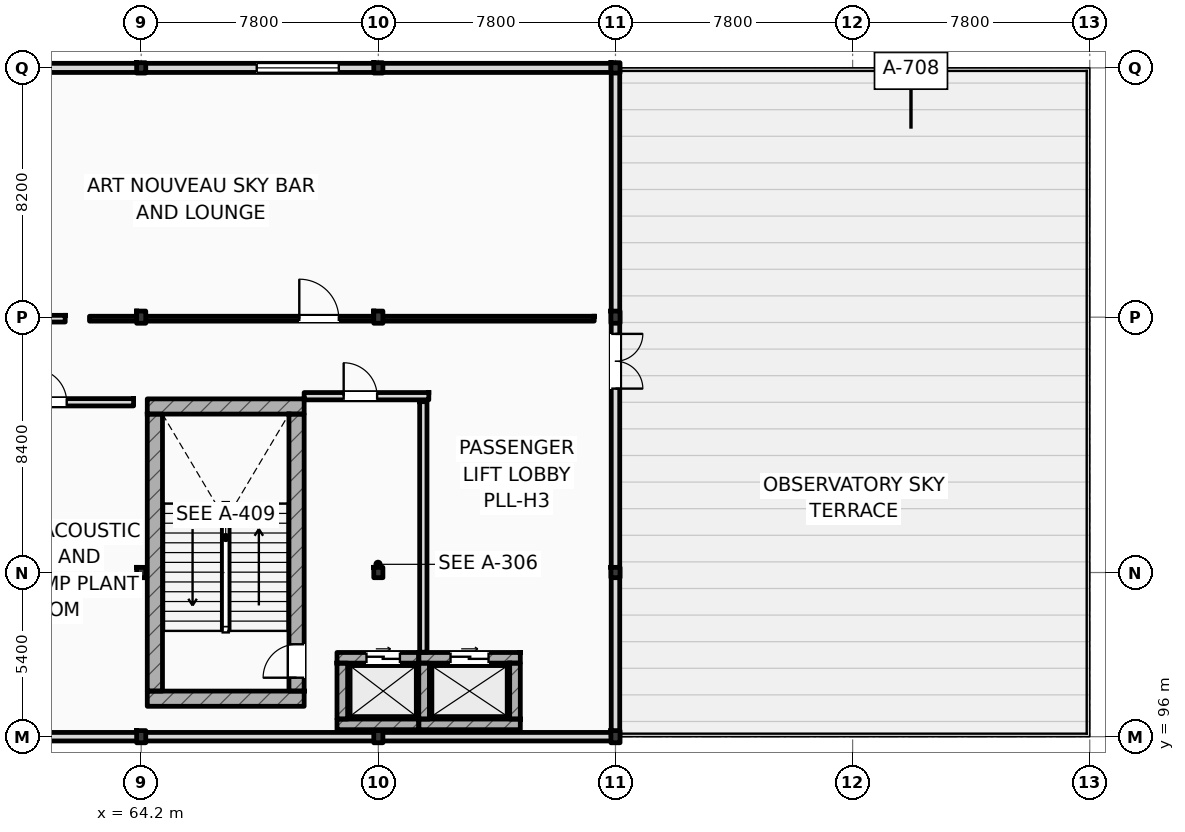
"""IFC4 building model, lengths in metres.
Left out: names, types, materials, properties, quantities, classifications, styles, units other than length and angle.
Written with IfcOpenShell. Run it as: python <this file> out.ifc"""

import sys

from ifc_helpers import new_model, si_unit, direction, frame, frame_2d, origin, origin_2d, place, context, subcontext, project, spatial, rectangle, i_section, extrude, element, fill, save


model = new_model("IFC4")
c1 = context("Model", 3, precision=1e-05, world=origin(), true_north=direction((0.0, 1.0)))
c2 = subcontext(c1, "Body", "Model", "MODEL_VIEW")
j1 = project(units=[si_unit("LENGTHUNIT", "METRE"), si_unit("PLANEANGLEUNIT", "RADIAN")], contexts=[c1])
p1 = place(None, origin())
s1 = spatial("IfcSite", under=j1, at=p1, CompositionType="ELEMENT")
p2 = place(p1, origin())
s2 = spatial("IfcBuilding", under=s1, at=p2, CompositionType="ELEMENT")
p3 = place(p2, frame((0.0, 0.0, 46.8)))
s3 = spatial("IfcBuildingStorey", under=s2, at=p3, CompositionType="ELEMENT", Elevation=46.8)
p4 = place(p3, frame((64.2, 96.0, 0.0), z_axis=(0.0, 0.0, 1.0), x_axis=(1.0, 0.0, 0.0)))
e1 = element("IfcColumn", 1, at=p4, inside=s3, PredefinedType="COLUMN", context=c2, shape_type="SweptSolid", body=[
    extrude(i_section(OverallWidth=0.3, OverallDepth=0.4, WebThickness=0.013, FlangeThickness=0.024, FilletRadius=0.027, at=origin_2d()), origin(), (0.0, 0.0, 1.0), 4.8),
])
p5 = place(p3, frame((64.2, 101.4, 0.0), z_axis=(0.0, 0.0, 1.0), x_axis=(1.0, 0.0, 0.0)))
e2 = element("IfcColumn", 2, at=p5, inside=s3, PredefinedType="COLUMN", context=c2, shape_type="SweptSolid", body=[
    extrude(i_section(OverallWidth=0.3, OverallDepth=0.34, WebThickness=0.012, FlangeThickness=0.021, FilletRadius=0.027, at=origin_2d()), origin(), (0.0, 0.0, 1.0), 4.8),
])
p6 = place(p3, frame((64.2, 109.8, 0.0), z_axis=(0.0, 0.0, 1.0), x_axis=(1.0, 0.0, 0.0)))
e3 = element("IfcColumn", 3, at=p6, inside=s3, PredefinedType="COLUMN", context=c2, shape_type="SweptSolid", body=[
    extrude(i_section(OverallWidth=0.3, OverallDepth=0.4, WebThickness=0.013, FlangeThickness=0.024, FilletRadius=0.027, at=origin_2d()), origin(), (0.0, 0.0, 1.0), 4.8),
])
p7 = place(p3, frame((64.2, 118.0, 0.0), z_axis=(0.0, 0.0, 1.0), x_axis=(1.0, 0.0, 0.0)))
e4 = element("IfcColumn", 4, at=p7, inside=s3, PredefinedType="COLUMN", context=c2, shape_type="SweptSolid", body=[
    extrude(i_section(OverallWidth=0.3, OverallDepth=0.34, WebThickness=0.012, FlangeThickness=0.021, FilletRadius=0.027, at=origin_2d()), origin(), (0.0, 0.0, 1.0), 4.8),
])
p8 = place(p3, frame((72.0, 96.0, 0.0), z_axis=(0.0, 0.0, 1.0), x_axis=(1.0, 0.0, 0.0)))
e5 = element("IfcColumn", 5, at=p8, inside=s3, PredefinedType="COLUMN", context=c2, shape_type="SweptSolid", body=[
    extrude(i_section(OverallWidth=0.3, OverallDepth=0.4, WebThickness=0.013, FlangeThickness=0.024, FilletRadius=0.027, at=origin_2d()), origin(), (0.0, 0.0, 1.0), 4.8),
])
p9 = place(p3, frame((72.0, 101.4, 0.0), z_axis=(0.0, 0.0, 1.0), x_axis=(1.0, 0.0, 0.0)))
e6 = element("IfcColumn", 6, at=p9, inside=s3, PredefinedType="COLUMN", context=c2, shape_type="SweptSolid", body=[
    extrude(i_section(OverallWidth=0.3, OverallDepth=0.34, WebThickness=0.012, FlangeThickness=0.021, FilletRadius=0.027, at=origin_2d()), origin(), (0.0, 0.0, 1.0), 4.8),
])
p10 = place(p3, frame((72.0, 109.8, 0.0), z_axis=(0.0, 0.0, 1.0), x_axis=(1.0, 0.0, 0.0)))
e7 = element("IfcColumn", 7, at=p10, inside=s3, PredefinedType="COLUMN", context=c2, shape_type="SweptSolid", body=[
    extrude(i_section(OverallWidth=0.3, OverallDepth=0.4, WebThickness=0.013, FlangeThickness=0.024, FilletRadius=0.027, at=origin_2d()), origin(), (0.0, 0.0, 1.0), 4.8),
])
p11 = place(p3, frame((72.0, 118.0, 0.0), z_axis=(0.0, 0.0, 1.0), x_axis=(1.0, 0.0, 0.0)))
e8 = element("IfcColumn", 8, at=p11, inside=s3, PredefinedType="COLUMN", context=c2, shape_type="SweptSolid", body=[
    extrude(i_section(OverallWidth=0.3, OverallDepth=0.34, WebThickness=0.012, FlangeThickness=0.021, FilletRadius=0.027, at=origin_2d()), origin(), (0.0, 0.0, 1.0), 4.8),
])
p12 = place(p3, frame((79.8, 96.0, 0.0), z_axis=(0.0, 0.0, 1.0), x_axis=(1.0, 0.0, 0.0)))
e9 = element("IfcColumn", 9, at=p12, inside=s3, PredefinedType="COLUMN", context=c2, shape_type="SweptSolid", body=[
    extrude(i_section(OverallWidth=0.3, OverallDepth=0.4, WebThickness=0.013, FlangeThickness=0.024, FilletRadius=0.027, at=origin_2d()), origin(), (0.0, 0.0, 1.0), 4.8),
])
p13 = place(p3, frame((79.8, 101.4, 0.0), z_axis=(0.0, 0.0, 1.0), x_axis=(1.0, 0.0, 0.0)))
e10 = element("IfcColumn", 10, at=p13, inside=s3, PredefinedType="COLUMN", context=c2, shape_type="SweptSolid", body=[
    extrude(i_section(OverallWidth=0.3, OverallDepth=0.34, WebThickness=0.012, FlangeThickness=0.021, FilletRadius=0.027, at=origin_2d()), origin(), (0.0, 0.0, 1.0), 4.8),
])
p14 = place(p3, frame((79.8, 109.8, 0.0), z_axis=(0.0, 0.0, 1.0), x_axis=(1.0, 0.0, 0.0)))
e11 = element("IfcColumn", 11, at=p14, inside=s3, PredefinedType="COLUMN", context=c2, shape_type="SweptSolid", body=[
    extrude(i_section(OverallWidth=0.3, OverallDepth=0.4, WebThickness=0.013, FlangeThickness=0.024, FilletRadius=0.027, at=origin_2d()), origin(), (0.0, 0.0, 1.0), 4.8),
])
p15 = place(p3, frame((79.8, 118.0, 0.0), z_axis=(0.0, 0.0, 1.0), x_axis=(1.0, 0.0, 0.0)))
e12 = element("IfcColumn", 12, at=p15, inside=s3, PredefinedType="COLUMN", context=c2, shape_type="SweptSolid", body=[
    extrude(i_section(OverallWidth=0.3, OverallDepth=0.34, WebThickness=0.012, FlangeThickness=0.021, FilletRadius=0.027, at=origin_2d()), origin(), (0.0, 0.0, 1.0), 4.8),
])
for number, where, z_axis, x_axis in (
    (13, (64.4, 106.862, 0.0), (0.0, 0.0, 1.0), (1.0, 0.0, 0.0)),
    (14, (64.4, 97.25, 0.0), (0.0, 0.0, 1.0), (1.0, 0.0, 0.0)),
):
    element("IfcWall", number, at=place(p3, frame(where, z_axis=z_axis, x_axis=x_axis)), inside=s3, PredefinedType="SHEAR", context=c2, shape_type="SweptSolid", body=[
        extrude(rectangle(XDim=5.16, YDim=0.5, at=frame_2d((2.58, 0.0))), origin(), (0.0, 0.0, 1.0), 4.8),
    ])
p16 = place(p3, frame((64.65, 97.5, 0.0), z_axis=(0.0, 0.0, 1.0), x_axis=(0.0, 1.0, 0.0)))
e15 = element("IfcWall", 15, at=p16, inside=s3, PredefinedType="SHEAR", context=c2, shape_type="SweptSolid", body=[
    extrude(rectangle(XDim=9.112, YDim=0.5, at=frame_2d((4.556, 0.0))), origin(), (0.0, 0.0, 1.0), 4.8),
])
p17 = place(p3, frame((69.31, 97.5, 0.0), z_axis=(0.0, 0.0, 1.0), x_axis=(0.0, 1.0, 0.0)))
e16 = element("IfcWall", 16, at=p17, inside=s3, PredefinedType="SHEAR", context=c2, shape_type="SweptSolid", body=[
    extrude(rectangle(XDim=9.112, YDim=0.5, at=frame_2d((4.556, 0.0))), origin(), (0.0, 0.0, 1.0), 4.8),
])
p18 = place(p17, frame((0.44, 0.0, 0.0)))
e17 = element("IfcOpeningElement", 17, at=p18, cuts=e16, PredefinedType="OPENING", context=c2, shape_type="SweptSolid", body=[
    extrude(rectangle(XDim=1.1, YDim=2.2, at=frame_2d((0.55, 1.1))), frame((0.0, 0.26, 0.0), z_axis=(0.0, -1.0, 0.0), x_axis=(1.0, 0.0, 0.0)), (0.0, 0.0, 1.0), 0.52),
])
p19 = place(p3, frame((22.5, 118.0, 0.0), z_axis=(0.0, 0.0, 1.0), x_axis=(1.0, 0.0, 0.0)))
e18 = element("IfcWall", 18, at=p19, inside=s3, PredefinedType="STANDARD", context=c2, shape_type="SweptSolid", body=[
    extrude(rectangle(XDim=57.3, YDim=0.3, at=frame_2d((28.65, 0.0))), origin(), (0.0, 0.0, 1.0), 4.08),
])
p20 = place(p19, frame((3.5, 0.0, 0.85)))
e19 = element("IfcOpeningElement", 19, at=p20, cuts=e18, PredefinedType="OPENING", context=c2, shape_type="SweptSolid", body=[
    extrude(rectangle(XDim=2.7, YDim=2.4, at=frame_2d((1.35, 1.2))), frame((0.0, 0.16, 0.0), z_axis=(0.0, -1.0, 0.0), x_axis=(1.0, 0.0, 0.0)), (0.0, 0.0, 1.0), 0.32),
])
p21 = place(p19, frame((19.1, 0.0, 0.85)))
e20 = element("IfcOpeningElement", 20, at=p21, cuts=e18, PredefinedType="OPENING", context=c2, shape_type="SweptSolid", body=[
    extrude(rectangle(XDim=2.7, YDim=2.4, at=frame_2d((1.35, 1.2))), frame((0.0, 0.16, 0.0), z_axis=(0.0, -1.0, 0.0), x_axis=(1.0, 0.0, 0.0)), (0.0, 0.0, 1.0), 0.32),
])
p22 = place(p19, frame((34.7, 0.0, 0.85)))
e21 = element("IfcOpeningElement", 21, at=p22, cuts=e18, PredefinedType="OPENING", context=c2, shape_type="SweptSolid", body=[
    extrude(rectangle(XDim=2.7, YDim=2.4, at=frame_2d((1.35, 1.2))), frame((0.0, 0.16, 0.0), z_axis=(0.0, -1.0, 0.0), x_axis=(1.0, 0.0, 0.0)), (0.0, 0.0, 1.0), 0.32),
])
p23 = place(p19, frame((45.5, 0.0, 0.85)))
e22 = element("IfcOpeningElement", 22, at=p23, cuts=e18, PredefinedType="OPENING", context=c2, shape_type="SweptSolid", body=[
    extrude(rectangle(XDim=2.7, YDim=2.4, at=frame_2d((1.35, 1.2))), frame((0.0, 0.16, 0.0), z_axis=(0.0, -1.0, 0.0), x_axis=(1.0, 0.0, 0.0)), (0.0, 0.0, 1.0), 0.32),
])
p24 = place(p3, frame((79.8, 96.0, 0.0), z_axis=(0.0, 0.0, 1.0), x_axis=(0.0, 1.0, 0.0)))
e23 = element("IfcWall", 23, at=p24, inside=s3, PredefinedType="STANDARD", context=c2, shape_type="SweptSolid", body=[
    extrude(rectangle(XDim=22.0, YDim=0.28, at=frame_2d((11.0, 0.0))), origin(), (0.0, 0.0, 1.0), 4.17),
])
p25 = place(p24, frame((11.45, 0.0, 0.0)))
e24 = element("IfcOpeningElement", 24, at=p25, cuts=e23, PredefinedType="OPENING", context=c2, shape_type="SweptSolid", body=[
    extrude(rectangle(XDim=1.8, YDim=2.4, at=frame_2d((0.9, 1.2))), frame((0.0, 0.15, 0.0), z_axis=(0.0, -1.0, 0.0), x_axis=(1.0, 0.0, 0.0)), (0.0, 0.0, 1.0), 0.3),
])
p26 = place(p3, frame((25.2, 96.0, 0.0), z_axis=(0.0, 0.0, 1.0), x_axis=(1.0, 0.0, 0.0)))
e25 = element("IfcWall", 25, at=p26, inside=s3, PredefinedType="STANDARD", context=c2, shape_type="SweptSolid", body=[
    extrude(rectangle(XDim=54.6, YDim=0.28, at=frame_2d((27.3, 0.0))), origin(), (0.0, 0.0, 1.0), 4.08),
])
p27 = place(p3, frame((70.64, 98.595, 0.0), z_axis=(0.0, 0.0, 1.0), x_axis=(1.0, 0.0, 0.0)))
e26 = element("IfcWall", 26, at=p27, inside=s3, PredefinedType="SHEAR", context=c2, shape_type="SweptSolid", body=[
    extrude(rectangle(XDim=2.69, YDim=0.35, at=frame_2d((1.345, 0.0))), origin(), (0.0, 0.0, 1.0), 4.54),
])
p28 = place(p27, frame((0.97, 0.0, 0.0)))
e27 = element("IfcOpeningElement", 27, at=p28, cuts=e26, PredefinedType="OPENING", context=c2, shape_type="SweptSolid", body=[
    extrude(rectangle(XDim=1.1, YDim=2.2, at=frame_2d((0.55, 1.1))), frame((0.0, 0.185, 0.0), z_axis=(0.0, -1.0, 0.0), x_axis=(1.0, 0.0, 0.0)), (0.0, 0.0, 1.0), 0.37),
])
p29 = place(p3, frame((70.64, 96.405, 0.0), z_axis=(0.0, 0.0, 1.0), x_axis=(1.0, 0.0, 0.0)))
e28 = element("IfcWall", 28, at=p29, inside=s3, PredefinedType="SHEAR", context=c2, shape_type="SweptSolid", body=[
    extrude(rectangle(XDim=2.69, YDim=0.35, at=frame_2d((1.345, 0.0))), origin(), (0.0, 0.0, 1.0), 4.54),
])
p30 = place(p3, frame((70.815, 96.58, 0.0), z_axis=(0.0, 0.0, 1.0), x_axis=(0.0, 1.0, 0.0)))
e29 = element("IfcWall", 29, at=p30, inside=s3, PredefinedType="SHEAR", context=c2, shape_type="SweptSolid", body=[
    extrude(rectangle(XDim=1.84, YDim=0.35, at=frame_2d((0.92, 0.0))), origin(), (0.0, 0.0, 1.0), 4.54),
])
p31 = place(p3, frame((73.33, 98.595, 0.0), z_axis=(0.0, 0.0, 1.0), x_axis=(1.0, 0.0, 0.0)))
e30 = element("IfcWall", 30, at=p31, inside=s3, PredefinedType="SHEAR", context=c2, shape_type="SweptSolid", body=[
    extrude(rectangle(XDim=3.34, YDim=0.35, at=frame_2d((1.67, 0.0))), origin(), (0.0, 0.0, 1.0), 4.54),
])
p32 = place(p31, frame((1.045, 0.0, 0.0)))
e31 = element("IfcOpeningElement", 31, at=p32, cuts=e30, PredefinedType="OPENING", context=c2, shape_type="SweptSolid", body=[
    extrude(rectangle(XDim=1.25, YDim=2.25, at=frame_2d((0.625, 1.125))), frame((0.0, 0.185, 0.0), z_axis=(0.0, -1.0, 0.0), x_axis=(1.0, 0.0, 0.0)), (0.0, 0.0, 1.0), 0.37),
])
p33 = place(p3, frame((73.33, 96.405, 0.0), z_axis=(0.0, 0.0, 1.0), x_axis=(1.0, 0.0, 0.0)))
e32 = element("IfcWall", 32, at=p33, inside=s3, PredefinedType="SHEAR", context=c2, shape_type="SweptSolid", body=[
    extrude(rectangle(XDim=3.34, YDim=0.35, at=frame_2d((1.67, 0.0))), origin(), (0.0, 0.0, 1.0), 4.54),
])
for number, where, z_axis, x_axis in (
    (33, (73.505, 96.58, 0.0), (0.0, 0.0, 1.0), (0.0, 1.0, 0.0)),
    (34, (76.495, 96.58, 0.0), (0.0, 0.0, 1.0), (0.0, 1.0, 0.0)),
):
    element("IfcWall", number, at=place(p3, frame(where, z_axis=z_axis, x_axis=x_axis)), inside=s3, PredefinedType="SHEAR", context=c2, shape_type="SweptSolid", body=[
        extrude(rectangle(XDim=1.84, YDim=0.35, at=frame_2d((0.92, 0.0))), origin(), (0.0, 0.0, 1.0), 4.54),
    ])
p34 = place(p3, frame((73.48, 98.78, 0.0), z_axis=(0.0, 0.0, 1.0), x_axis=(0.0, 1.0, 0.0)))
e35 = element("IfcWall", 35, at=p34, inside=s3, PredefinedType="STANDARD", context=c2, shape_type="SweptSolid", body=[
    extrude(rectangle(XDim=8.24, YDim=0.24, at=frame_2d((4.12, 0.0))), origin(), (0.0, 0.0, 1.0), 4.54),
])
p35 = place(p3, frame((69.56, 107.2, 0.0), z_axis=(0.0, 0.0, 1.0), x_axis=(1.0, 0.0, 0.0)))
e36 = element("IfcWall", 36, at=p35, inside=s3, PredefinedType="STANDARD", context=c2, shape_type="SweptSolid", body=[
    extrude(rectangle(XDim=4.1, YDim=0.24, at=frame_2d((2.05, 0.0))), origin(), (0.0, 0.0, 1.0), 4.54),
])
p36 = place(p35, frame((1.3, 0.0, 0.0)))
e37 = element("IfcOpeningElement", 37, at=p36, cuts=e36, PredefinedType="OPENING", context=c2, shape_type="SweptSolid", body=[
    extrude(rectangle(XDim=1.1, YDim=2.2, at=frame_2d((0.55, 1.1))), frame((0.0, 0.13, 0.0), z_axis=(0.0, -1.0, 0.0), x_axis=(1.0, 0.0, 0.0)), (0.0, 0.0, 1.0), 0.26),
])
p37 = place(p3, frame((23.3, 109.75, 0.0), z_axis=(0.0, 0.0, 1.0), x_axis=(1.0, 0.0, 0.0)))
e38 = element("IfcWall", 38, at=p37, inside=s3, PredefinedType="PARTITIONING", context=c2, shape_type="SweptSolid", body=[
    extrude(rectangle(XDim=38.4, YDim=0.22, at=frame_2d((19.2, 0.0))), origin(), (0.0, 0.0, 1.0), 3.98),
])
p38 = place(p37, frame((18.7, 0.0, 0.0)))
e39 = element("IfcOpeningElement", 39, at=p38, cuts=e38, PredefinedType="OPENING", context=c2, shape_type="SweptSolid", body=[
    extrude(rectangle(XDim=2.0, YDim=2.35, at=frame_2d((1.0, 1.175))), frame((0.0, 0.12, 0.0), z_axis=(0.0, -1.0, 0.0), x_axis=(1.0, 0.0, 0.0)), (0.0, 0.0, 1.0), 0.24),
])
p39 = place(p3, frame((62.5, 109.75, 0.0), z_axis=(0.0, 0.0, 1.0), x_axis=(1.0, 0.0, 0.0)))
e40 = element("IfcWall", 40, at=p39, inside=s3, PredefinedType="PARTITIONING", context=c2, shape_type="SweptSolid", body=[
    extrude(rectangle(XDim=16.6, YDim=0.16, at=frame_2d((8.3, 0.0))), origin(), (0.0, 0.0, 1.0), 4.08),
])
p40 = place(p39, frame((6.9, 0.0, 0.0)))
e41 = element("IfcOpeningElement", 41, at=p40, cuts=e40, PredefinedType="OPENING", context=c2, shape_type="SweptSolid", body=[
    extrude(rectangle(XDim=1.3, YDim=2.2, at=frame_2d((0.65, 1.1))), frame((0.0, 0.09, 0.0), z_axis=(0.0, -1.0, 0.0), x_axis=(1.0, 0.0, 0.0)), (0.0, 0.0, 1.0), 0.18),
])
p41 = place(p3, frame((58.45, 107.0, 0.0), z_axis=(0.0, 0.0, 1.0), x_axis=(1.0, 0.0, 0.0)))
e42 = element("IfcWall", 42, at=p41, inside=s3, PredefinedType="STANDARD", context=c2, shape_type="SweptSolid", body=[
    extrude(rectangle(XDim=5.5, YDim=0.24, at=frame_2d((2.75, 0.0))), origin(), (0.0, 0.0, 1.0), 4.54),
])
p42 = place(p41, frame((2.2, 0.0, 0.0)))
e43 = element("IfcOpeningElement", 43, at=p42, cuts=e42, PredefinedType="OPENING", context=c2, shape_type="SweptSolid", body=[
    extrude(rectangle(XDim=1.1, YDim=2.2, at=frame_2d((0.55, 1.1))), frame((0.0, 0.13, 0.0), z_axis=(0.0, -1.0, 0.0), x_axis=(1.0, 0.0, 0.0)), (0.0, 0.0, 1.0), 0.26),
])
p43 = place(p23, origin())
e44 = element("IfcWindow", 44, at=p43, inside=s3, PartitioningType="DOUBLE_PANEL_VERTICAL", PredefinedType="WINDOW", context=c2, shape_type="SweptSolid", body=[
    extrude(rectangle(XDim=2.7, YDim=2.4, at=frame_2d((1.35, 1.2))), frame((0.0, 0.03, 0.0), z_axis=(0.0, -1.0, 0.0), x_axis=(1.0, 0.0, 0.0)), (0.0, 0.0, 1.0), 0.06),
])
fill(e22, e44)
p44 = place(p25, frame((1.8, 0.0, 0.0), z_axis=(0.0, 0.0, 1.0), x_axis=(-1.0, 0.0, 0.0)))
e45 = element("IfcDoor", 45, at=p44, inside=s3, OperationType="DOUBLE_SWING_LEFT", PredefinedType="DOOR", context=c2, shape_type="SweptSolid", body=[
    extrude(rectangle(XDim=1.8, YDim=2.4, at=frame_2d((0.9, 1.2))), frame((0.0, 0.025, 0.0), z_axis=(0.0, -1.0, 0.0), x_axis=(1.0, 0.0, 0.0)), (0.0, 0.0, 1.0), 0.05),
])
fill(e24, e45)
p45 = place(p18, origin())
e46 = element("IfcDoor", 46, at=p45, inside=s3, OperationType="SINGLE_SWING_LEFT", PredefinedType="DOOR", context=c2, shape_type="SweptSolid", body=[
    extrude(rectangle(XDim=1.1, YDim=2.2, at=frame_2d((0.55, 1.1))), frame((0.0, 0.025, 0.0), z_axis=(0.0, -1.0, 0.0), x_axis=(1.0, 0.0, 0.0)), (0.0, 0.0, 1.0), 0.05),
])
fill(e17, e46)
p46 = place(p28, origin())
e47 = element("IfcDoor", 47, at=p46, inside=s3, OperationType="SLIDING_TO_LEFT", PredefinedType="DOOR", context=c2, shape_type="SweptSolid", body=[
    extrude(rectangle(XDim=1.1, YDim=2.2, at=frame_2d((0.55, 1.1))), frame((0.0, 0.025, 0.0), z_axis=(0.0, -1.0, 0.0), x_axis=(1.0, 0.0, 0.0)), (0.0, 0.0, 1.0), 0.05),
])
fill(e27, e47)
p47 = place(p32, origin())
e48 = element("IfcDoor", 48, at=p47, inside=s3, OperationType="SLIDING_TO_LEFT", PredefinedType="DOOR", context=c2, shape_type="SweptSolid", body=[
    extrude(rectangle(XDim=1.25, YDim=2.25, at=frame_2d((0.625, 1.125))), frame((0.0, 0.025, 0.0), z_axis=(0.0, -1.0, 0.0), x_axis=(1.0, 0.0, 0.0)), (0.0, 0.0, 1.0), 0.05),
])
fill(e31, e48)
p48 = place(p36, origin())
e49 = element("IfcDoor", 49, at=p48, inside=s3, OperationType="SINGLE_SWING_LEFT", PredefinedType="DOOR", context=c2, shape_type="SweptSolid", body=[
    extrude(rectangle(XDim=1.1, YDim=2.2, at=frame_2d((0.55, 1.1))), frame((0.0, 0.025, 0.0), z_axis=(0.0, -1.0, 0.0), x_axis=(1.0, 0.0, 0.0)), (0.0, 0.0, 1.0), 0.05),
])
fill(e37, e49)
p49 = place(p40, origin())
e50 = element("IfcDoor", 50, at=p49, inside=s3, OperationType="SINGLE_SWING_LEFT", PredefinedType="DOOR", context=c2, shape_type="SweptSolid", body=[
    extrude(rectangle(XDim=1.3, YDim=2.2, at=frame_2d((0.65, 1.1))), frame((0.0, 0.025, 0.0), z_axis=(0.0, -1.0, 0.0), x_axis=(1.0, 0.0, 0.0)), (0.0, 0.0, 1.0), 0.05),
])
fill(e41, e50)
p50 = place(p42, origin())
e51 = element("IfcDoor", 51, at=p50, inside=s3, OperationType="SINGLE_SWING_LEFT", PredefinedType="DOOR", context=c2, shape_type="SweptSolid", body=[
    extrude(rectangle(XDim=1.1, YDim=2.2, at=frame_2d((0.55, 1.1))), frame((0.0, 0.025, 0.0), z_axis=(0.0, -1.0, 0.0), x_axis=(1.0, 0.0, 0.0)), (0.0, 0.0, 1.0), 0.05),
])
fill(e43, e51)
save(model, sys.argv[1])
